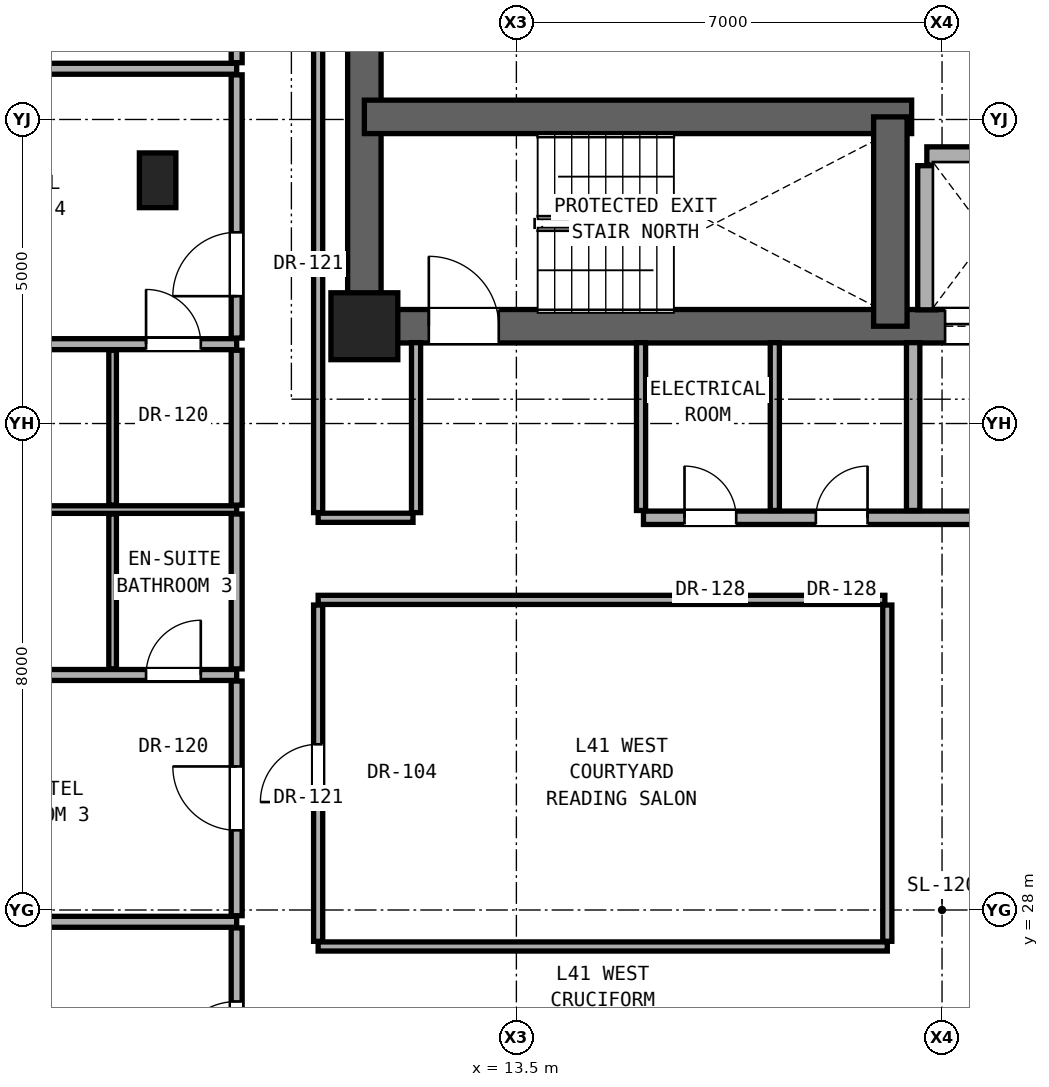
"""IFC4 building model, lengths in metres.
Left out: names, types, materials, properties, quantities, classifications, styles, units other than length and angle.
Written with IfcOpenShell. Run it as: python <this file> out.ifc"""

import sys

from ifc_helpers import new_model, si_unit, direction, frame, frame_2d, origin, origin_2d, place, context, subcontext, project, spatial, rectangle, extrude, element, fill, save


model = new_model("IFC4")
c1 = context("Model", 3, precision=1e-05, world=origin(), true_north=direction((0.0, 1.0)))
c2 = subcontext(c1, "Body", "Model", "MODEL_VIEW")
j1 = project(units=[si_unit("LENGTHUNIT", "METRE"), si_unit("PLANEANGLEUNIT", "RADIAN")], contexts=[c1])
p1 = place(None, origin())
s1 = spatial("IfcSite", under=j1, at=p1, CompositionType="ELEMENT")
p2 = place(p1, origin())
s2 = spatial("IfcBuilding", under=s1, at=p2, CompositionType="ELEMENT")
p3 = place(p2, frame((0.0, 0.0, 144.5)))
s3 = spatial("IfcBuildingStorey", under=s2, at=p3, CompositionType="ELEMENT", Elevation=144.5)
p4 = place(p3, frame((11.0, 37.6, 0.0), z_axis=(0.0, 0.0, 1.0), x_axis=(1.0, 0.0, 0.0)))
e1 = element("IfcColumn", 1, at=p4, inside=s3, PredefinedType="COLUMN", context=c2, shape_type="SweptSolid", body=[
    extrude(rectangle(XDim=1.1, YDim=1.1, at=origin_2d()), origin(), (0.0, 0.0, 1.0), 3.3),
])
p5 = place(p3, frame((7.6, 40.0, 0.0), z_axis=(0.0, 0.0, 1.0), x_axis=(1.0, 0.0, 0.0)))
e2 = element("IfcColumn", 2, at=p5, inside=s3, PredefinedType="PILASTER", context=c2, shape_type="SweptSolid", body=[
    extrude(rectangle(XDim=0.6, YDim=0.9, at=origin_2d()), origin(), (0.0, 0.0, 1.0), 3.3),
])
p6 = place(p3, frame((11.0, 37.6, 0.0), z_axis=(0.0, 0.0, 1.0), x_axis=(0.0, 1.0, 0.0)))
e3 = element("IfcWall", 3, at=p6, inside=s3, PredefinedType="SHEAR", context=c2, shape_type="SweptSolid", body=[
    extrude(rectangle(XDim=6.0, YDim=0.55, at=frame_2d((3.0, 0.0))), origin(), (0.0, 0.0, 1.0), 2.94),
])
p7 = place(p3, frame((11.0, 37.6, 0.0), z_axis=(0.0, 0.0, 1.0), x_axis=(1.0, 0.0, 0.0)))
e4 = element("IfcWall", 4, at=p7, inside=s3, PredefinedType="SHEAR", context=c2, shape_type="SweptSolid", body=[
    extrude(rectangle(XDim=19.0, YDim=0.55, at=frame_2d((9.5, 0.0))), origin(), (0.0, 0.0, 1.0), 2.94),
])
p8 = place(p7, frame((1.06, 0.0, 0.0)))
e5 = element("IfcOpeningElement", 5, at=p8, cuts=e4, PredefinedType="OPENING", context=c2, shape_type="SweptSolid", body=[
    extrude(rectangle(XDim=1.15, YDim=2.2, at=frame_2d((0.575, 1.1))), frame((0.0, 0.285, 0.0), z_axis=(0.0, -1.0, 0.0), x_axis=(1.0, 0.0, 0.0)), (0.0, 0.0, 1.0), 0.57),
])
p9 = place(p7, frame((9.55, 0.0, 0.0)))
e6 = element("IfcOpeningElement", 6, at=p9, cuts=e4, PredefinedType="OPENING", context=c2, shape_type="SweptSolid", body=[
    extrude(rectangle(XDim=1.4, YDim=2.35, at=frame_2d((0.7, 1.175))), frame((0.0, 0.285, 0.0), z_axis=(0.0, -1.0, 0.0), x_axis=(1.0, 0.0, 0.0)), (0.0, 0.0, 1.0), 0.57),
])
p10 = place(p7, frame((11.95, 0.0, 0.0)))
e7 = element("IfcOpeningElement", 7, at=p10, cuts=e4, PredefinedType="OPENING", context=c2, shape_type="SweptSolid", body=[
    extrude(rectangle(XDim=1.4, YDim=2.35, at=frame_2d((0.7, 1.175))), frame((0.0, 0.285, 0.0), z_axis=(0.0, -1.0, 0.0), x_axis=(1.0, 0.0, 0.0)), (0.0, 0.0, 1.0), 0.57),
])
p11 = place(p3, frame((11.0, 41.043, 0.0), z_axis=(0.0, 0.0, 1.0), x_axis=(1.0, 0.0, 0.0)))
e8 = element("IfcWall", 8, at=p11, inside=s3, PredefinedType="SHEAR", context=c2, shape_type="SweptSolid", body=[
    extrude(rectangle(XDim=9.0, YDim=0.55, at=frame_2d((4.5, 0.0))), origin(), (0.0, 0.0, 1.0), 2.94),
])
p12 = place(p3, frame((19.65, 37.6, 0.0), z_axis=(0.0, 0.0, 1.0), x_axis=(0.0, 1.0, 0.0)))
e9 = element("IfcWall", 9, at=p12, inside=s3, PredefinedType="SHEAR", context=c2, shape_type="SweptSolid", body=[
    extrude(rectangle(XDim=3.443, YDim=0.55, at=frame_2d((1.721, 0.0))), origin(), (0.0, 0.0, 1.0), 2.94),
])
p13 = place(p3, frame((10.24, 27.4, 0.0), z_axis=(0.0, 0.0, 1.0), x_axis=(1.0, 0.0, 0.0)))
e10 = element("IfcWall", 10, at=p13, inside=s3, PredefinedType="PARTITIONING", context=c2, shape_type="SweptSolid", body=[
    extrude(rectangle(XDim=9.36, YDim=0.15, at=frame_2d((4.68, 0.0))), origin(), (0.0, 0.0, 1.0), 2.316),
])
p14 = place(p3, frame((-1.62, 27.806, 0.0), z_axis=(0.0, 0.0, 1.0), x_axis=(1.0, 0.0, 0.0)))
e11 = element("IfcWall", 11, at=p14, inside=s3, PredefinedType="PARTITIONING", context=c2, shape_type="SweptSolid", body=[
    extrude(rectangle(XDim=10.52, YDim=0.18, at=frame_2d((5.26, 0.0))), origin(), (0.0, 0.0, 1.0), 2.159),
])
p15 = place(p3, frame((-1.62, 31.865, 0.0), z_axis=(0.0, 0.0, 1.0), x_axis=(1.0, 0.0, 0.0)))
e12 = element("IfcWall", 12, at=p15, inside=s3, PredefinedType="PARTITIONING", context=c2, shape_type="SweptSolid", body=[
    extrude(rectangle(XDim=10.52, YDim=0.18, at=frame_2d((5.26, 0.0))), origin(), (0.0, 0.0, 1.0), 2.159),
])
p16 = place(p15, frame((4.435, 0.0, 0.0)))
e13 = element("IfcOpeningElement", 13, at=p16, cuts=e12, PredefinedType="OPENING", context=c2, shape_type="SweptSolid", body=[
    extrude(rectangle(XDim=0.85, YDim=2.01, at=frame_2d((0.425, 1.005))), frame((0.0, 0.1, 0.0), z_axis=(0.0, -1.0, 0.0), x_axis=(1.0, 0.0, 0.0)), (0.0, 0.0, 1.0), 0.2),
])
p17 = place(p15, frame((9.03, 0.0, 0.0)))
e14 = element("IfcOpeningElement", 14, at=p17, cuts=e12, PredefinedType="OPENING", context=c2, shape_type="SweptSolid", body=[
    extrude(rectangle(XDim=0.9, YDim=2.1, at=frame_2d((0.45, 1.05))), frame((0.0, 0.1, 0.0), z_axis=(0.0, -1.0, 0.0), x_axis=(1.0, 0.0, 0.0)), (0.0, 0.0, 1.0), 0.2),
])
p18 = place(p3, frame((10.24, 33.1, 0.0), z_axis=(0.0, 0.0, 1.0), x_axis=(1.0, 0.0, 0.0)))
e15 = element("IfcWall", 15, at=p18, inside=s3, PredefinedType="PARTITIONING", context=c2, shape_type="SweptSolid", body=[
    extrude(rectangle(XDim=9.32, YDim=0.15, at=frame_2d((4.66, 0.0))), origin(), (0.0, 0.0, 1.0), 2.316),
])
p19 = place(p3, frame((-1.62, 34.585, 0.0), z_axis=(0.0, 0.0, 1.0), x_axis=(1.0, 0.0, 0.0)))
e16 = element("IfcWall", 16, at=p19, inside=s3, PredefinedType="PARTITIONING", context=c2, shape_type="SweptSolid", body=[
    extrude(rectangle(XDim=10.52, YDim=0.125, at=frame_2d((5.26, 0.0))), origin(), (0.0, 0.0, 1.0), 2.159),
])
p20 = place(p3, frame((10.24, 34.45, 0.0), z_axis=(0.0, 0.0, 1.0), x_axis=(1.0, 0.0, 0.0)))
e17 = element("IfcWall", 17, at=p20, inside=s3, PredefinedType="PARTITIONING", context=c2, shape_type="SweptSolid", body=[
    extrude(rectangle(XDim=1.56, YDim=0.15, at=frame_2d((0.78, 0.0))), origin(), (0.0, 0.0, 1.0), 2.316),
])
p21 = place(p3, frame((15.59, 34.45, 0.0), z_axis=(0.0, 0.0, 1.0), x_axis=(1.0, 0.0, 0.0)))
e18 = element("IfcWall", 18, at=p21, inside=s3, PredefinedType="SOLIDWALL", context=c2, shape_type="SweptSolid", body=[
    extrude(rectangle(XDim=15.17, YDim=0.22, at=frame_2d((7.585, 0.0))), origin(), (0.0, 0.0, 1.0), 2.316),
])
p22 = place(p21, frame((6.26, 0.0, 0.0)))
e19 = element("IfcOpeningElement", 19, at=p22, cuts=e18, PredefinedType="OPENING", context=c2, shape_type="SweptSolid", body=[
    extrude(rectangle(XDim=1.2, YDim=2.25, at=frame_2d((0.6, 1.125))), frame((0.0, 0.12, 0.0), z_axis=(0.0, -1.0, 0.0), x_axis=(1.0, 0.0, 0.0)), (0.0, 0.0, 1.0), 0.24),
])
p23 = place(p21, frame((9.96, 0.0, 0.0)))
e20 = element("IfcOpeningElement", 20, at=p23, cuts=e18, PredefinedType="OPENING", context=c2, shape_type="SweptSolid", body=[
    extrude(rectangle(XDim=0.95, YDim=2.15, at=frame_2d((0.475, 1.075))), frame((0.0, 0.12, 0.0), z_axis=(0.0, -1.0, 0.0), x_axis=(1.0, 0.0, 0.0)), (0.0, 0.0, 1.0), 0.24),
])
p24 = place(p21, frame((12.21, 0.0, 0.0)))
e21 = element("IfcOpeningElement", 21, at=p24, cuts=e18, PredefinedType="OPENING", context=c2, shape_type="SweptSolid", body=[
    extrude(rectangle(XDim=0.95, YDim=2.15, at=frame_2d((0.475, 1.075))), frame((0.0, 0.12, 0.0), z_axis=(0.0, -1.0, 0.0), x_axis=(1.0, 0.0, 0.0)), (0.0, 0.0, 1.0), 0.24),
])
p25 = place(p21, frame((0.675, 0.0, 0.0)))
e22 = element("IfcOpeningElement", 22, at=p25, cuts=e18, PredefinedType="OPENING", context=c2, shape_type="SweptSolid", body=[
    extrude(rectangle(XDim=0.85, YDim=2.01, at=frame_2d((0.425, 1.005))), frame((0.0, 0.12, 0.0), z_axis=(0.0, -1.0, 0.0), x_axis=(1.0, 0.0, 0.0)), (0.0, 0.0, 1.0), 0.24),
])
p26 = place(p21, frame((2.835, 0.0, 0.0)))
e23 = element("IfcOpeningElement", 23, at=p26, cuts=e18, PredefinedType="OPENING", context=c2, shape_type="SweptSolid", body=[
    extrude(rectangle(XDim=0.85, YDim=2.01, at=frame_2d((0.425, 1.005))), frame((0.0, 0.12, 0.0), z_axis=(0.0, -1.0, 0.0), x_axis=(1.0, 0.0, 0.0)), (0.0, 0.0, 1.0), 0.24),
])
p27 = place(p3, frame((-1.62, 37.305, 0.0), z_axis=(0.0, 0.0, 1.0), x_axis=(1.0, 0.0, 0.0)))
e24 = element("IfcWall", 24, at=p27, inside=s3, PredefinedType="PARTITIONING", context=c2, shape_type="SweptSolid", body=[
    extrude(rectangle(XDim=10.52, YDim=0.18, at=frame_2d((5.26, 0.0))), origin(), (0.0, 0.0, 1.0), 2.159),
])
p28 = place(p27, frame((4.435, 0.0, 0.0)))
e25 = element("IfcOpeningElement", 25, at=p28, cuts=e24, PredefinedType="OPENING", context=c2, shape_type="SweptSolid", body=[
    extrude(rectangle(XDim=0.85, YDim=2.01, at=frame_2d((0.425, 1.005))), frame((0.0, 0.1, 0.0), z_axis=(0.0, -1.0, 0.0), x_axis=(1.0, 0.0, 0.0)), (0.0, 0.0, 1.0), 0.2),
])
p29 = place(p27, frame((9.03, 0.0, 0.0)))
e26 = element("IfcOpeningElement", 26, at=p29, cuts=e24, PredefinedType="OPENING", context=c2, shape_type="SweptSolid", body=[
    extrude(rectangle(XDim=0.9, YDim=2.1, at=frame_2d((0.45, 1.05))), frame((0.0, 0.1, 0.0), z_axis=(0.0, -1.0, 0.0), x_axis=(1.0, 0.0, 0.0)), (0.0, 0.0, 1.0), 0.2),
])
p30 = place(p3, frame((20.25, 40.4, 0.0), z_axis=(0.0, 0.0, 1.0), x_axis=(1.0, 0.0, 0.0)))
e27 = element("IfcWall", 27, at=p30, inside=s3, PredefinedType="SOLIDWALL", context=c2, shape_type="SweptSolid", body=[
    extrude(rectangle(XDim=4.4, YDim=0.3, at=frame_2d((2.2, 0.0))), origin(), (0.0, 0.0, 1.0), 2.94),
])
p31 = place(p3, frame((3.67, 41.834, 0.0), z_axis=(0.0, 0.0, 1.0), x_axis=(1.0, 0.0, 0.0)))
e28 = element("IfcWall", 28, at=p31, inside=s3, PredefinedType="PARTITIONING", context=c2, shape_type="SweptSolid", body=[
    extrude(rectangle(XDim=5.23, YDim=0.18, at=frame_2d((2.615, 0.0))), origin(), (0.0, 0.0, 1.0), 2.94),
])
p32 = place(p3, frame((6.86, 31.965, 0.0), z_axis=(0.0, 0.0, 1.0), x_axis=(0.0, 1.0, 0.0)))
e29 = element("IfcWall", 29, at=p32, inside=s3, PredefinedType="PARTITIONING", context=c2, shape_type="SweptSolid", body=[
    extrude(rectangle(XDim=2.547, YDim=0.125, at=frame_2d((1.274, 0.0))), origin(), (0.0, 0.0, 1.0), 2.94),
])
p33 = place(p3, frame((6.86, 34.657, 0.0), z_axis=(0.0, 0.0, 1.0), x_axis=(0.0, 1.0, 0.0)))
e30 = element("IfcWall", 30, at=p33, inside=s3, PredefinedType="PARTITIONING", context=c2, shape_type="SweptSolid", body=[
    extrude(rectangle(XDim=2.548, YDim=0.125, at=frame_2d((1.274, 0.0))), origin(), (0.0, 0.0, 1.0), 2.332),
])
p34 = place(p3, frame((8.9, 24.235, 0.0), z_axis=(0.0, 0.0, 1.0), x_axis=(0.0, 1.0, 0.0)))
e31 = element("IfcWall", 31, at=p34, inside=s3, PredefinedType="PARTITIONING", context=c2, shape_type="SweptSolid", body=[
    extrude(rectangle(XDim=3.471, YDim=0.18, at=frame_2d((1.735, 0.0))), origin(), (0.0, 0.0, 1.0), 2.316),
])
p35 = place(p34, frame((1.21, 0.0, 0.0)))
e32 = element("IfcOpeningElement", 32, at=p35, cuts=e31, PredefinedType="OPENING", context=c2, shape_type="SweptSolid", body=[
    extrude(rectangle(XDim=1.05, YDim=2.2, at=frame_2d((0.525, 1.1))), frame((0.0, 0.1, 0.0), z_axis=(0.0, -1.0, 0.0), x_axis=(1.0, 0.0, 0.0)), (0.0, 0.0, 1.0), 0.2),
])
p36 = place(p3, frame((8.9, 27.906, 0.0), z_axis=(0.0, 0.0, 1.0), x_axis=(0.0, 1.0, 0.0)))
e33 = element("IfcWall", 33, at=p36, inside=s3, PredefinedType="PARTITIONING", context=c2, shape_type="SweptSolid", body=[
    extrude(rectangle(XDim=3.859, YDim=0.18, at=frame_2d((1.929, 0.0))), origin(), (0.0, 0.0, 1.0), 2.316),
])
p37 = place(p36, frame((1.405, 0.0, 0.0)))
e34 = element("IfcOpeningElement", 34, at=p37, cuts=e33, PredefinedType="OPENING", context=c2, shape_type="SweptSolid", body=[
    extrude(rectangle(XDim=1.05, YDim=2.2, at=frame_2d((0.525, 1.1))), frame((0.0, 0.1, 0.0), z_axis=(0.0, -1.0, 0.0), x_axis=(1.0, 0.0, 0.0)), (0.0, 0.0, 1.0), 0.2),
])
p38 = place(p3, frame((8.9, 31.965, 0.0), z_axis=(0.0, 0.0, 1.0), x_axis=(0.0, 1.0, 0.0)))
e35 = element("IfcWall", 35, at=p38, inside=s3, PredefinedType="PARTITIONING", context=c2, shape_type="SweptSolid", body=[
    extrude(rectangle(XDim=2.547, YDim=0.18, at=frame_2d((1.274, 0.0))), origin(), (0.0, 0.0, 1.0), 2.94),
])
p39 = place(p3, frame((8.9, 34.657, 0.0), z_axis=(0.0, 0.0, 1.0), x_axis=(0.0, 1.0, 0.0)))
e36 = element("IfcWall", 36, at=p39, inside=s3, PredefinedType="PARTITIONING", context=c2, shape_type="SweptSolid", body=[
    extrude(rectangle(XDim=2.548, YDim=0.18, at=frame_2d((1.274, 0.0))), origin(), (0.0, 0.0, 1.0), 2.332),
])
p40 = place(p3, frame((8.9, 37.405, 0.0), z_axis=(0.0, 0.0, 1.0), x_axis=(0.0, 1.0, 0.0)))
e37 = element("IfcWall", 37, at=p40, inside=s3, PredefinedType="PARTITIONING", context=c2, shape_type="SweptSolid", body=[
    extrude(rectangle(XDim=4.329, YDim=0.18, at=frame_2d((2.165, 0.0))), origin(), (0.0, 0.0, 1.0), 2.316),
])
p41 = place(p40, frame((0.689, 0.0, 0.0)))
e38 = element("IfcOpeningElement", 38, at=p41, cuts=e37, PredefinedType="OPENING", context=c2, shape_type="SweptSolid", body=[
    extrude(rectangle(XDim=1.05, YDim=2.2, at=frame_2d((0.525, 1.1))), frame((0.0, 0.1, 0.0), z_axis=(0.0, -1.0, 0.0), x_axis=(1.0, 0.0, 0.0)), (0.0, 0.0, 1.0), 0.2),
])
p42 = place(p3, frame((8.9, 41.934, 0.0), z_axis=(0.0, 0.0, 1.0), x_axis=(0.0, 1.0, 0.0)))
e39 = element("IfcWall", 39, at=p42, inside=s3, PredefinedType="PARTITIONING", context=c2, shape_type="SweptSolid", body=[
    extrude(rectangle(XDim=5.17, YDim=0.18, at=frame_2d((2.585, 0.0))), origin(), (0.0, 0.0, 1.0), 2.94),
])
p43 = place(p42, frame((2.11, 0.0, 0.0)))
e40 = element("IfcOpeningElement", 40, at=p43, cuts=e39, PredefinedType="OPENING", context=c2, shape_type="SweptSolid", body=[
    extrude(rectangle(XDim=0.95, YDim=2.15, at=frame_2d((0.475, 1.075))), frame((0.0, 0.1, 0.0), z_axis=(0.0, -1.0, 0.0), x_axis=(1.0, 0.0, 0.0)), (0.0, 0.0, 1.0), 0.2),
])
p44 = place(p3, frame((10.24, 27.485, 0.0), z_axis=(0.0, 0.0, 1.0), x_axis=(0.0, 1.0, 0.0)))
e41 = element("IfcWall", 41, at=p44, inside=s3, PredefinedType="PARTITIONING", context=c2, shape_type="SweptSolid", body=[
    extrude(rectangle(XDim=5.53, YDim=0.15, at=frame_2d((2.765, 0.0))), origin(), (0.0, 0.0, 1.0), 2.316),
])
p45 = place(p44, frame((2.29, 0.0, 0.0)))
e42 = element("IfcOpeningElement", 42, at=p45, cuts=e41, PredefinedType="OPENING", context=c2, shape_type="SweptSolid", body=[
    extrude(rectangle(XDim=0.95, YDim=2.15, at=frame_2d((0.475, 1.075))), frame((0.0, 0.085, 0.0), z_axis=(0.0, -1.0, 0.0), x_axis=(1.0, 0.0, 0.0)), (0.0, 0.0, 1.0), 0.17),
])
p46 = place(p3, frame((10.24, 34.535, 0.0), z_axis=(0.0, 0.0, 1.0), x_axis=(0.0, 1.0, 0.0)))
e43 = element("IfcWall", 43, at=p46, inside=s3, PredefinedType="PARTITIONING", context=c2, shape_type="SweptSolid", body=[
    extrude(rectangle(XDim=9.13, YDim=0.15, at=frame_2d((4.565, 0.0))), origin(), (0.0, 0.0, 1.0), 2.316),
])
p47 = place(p3, frame((11.85, 34.535, 0.0), z_axis=(0.0, 0.0, 1.0), x_axis=(0.0, 1.0, 0.0)))
e44 = element("IfcWall", 44, at=p47, inside=s3, PredefinedType="PARTITIONING", context=c2, shape_type="SweptSolid", body=[
    extrude(rectangle(XDim=2.795, YDim=0.15, at=frame_2d((1.397, 0.0))), origin(), (0.0, 0.0, 1.0), 2.94),
])
p48 = place(p3, frame((15.55, 34.57, 0.0), z_axis=(0.0, 0.0, 1.0), x_axis=(0.0, 1.0, 0.0)))
e45 = element("IfcWall", 45, at=p48, inside=s3, PredefinedType="PARTITIONING", context=c2, shape_type="SweptSolid", body=[
    extrude(rectangle(XDim=2.76, YDim=0.15, at=frame_2d((1.38, 0.0))), origin(), (0.0, 0.0, 1.0), 2.469),
])
p49 = place(p3, frame((17.75, 34.57, 0.0), z_axis=(0.0, 0.0, 1.0), x_axis=(0.0, 1.0, 0.0)))
e46 = element("IfcWall", 46, at=p49, inside=s3, PredefinedType="PARTITIONING", context=c2, shape_type="SweptSolid", body=[
    extrude(rectangle(XDim=2.76, YDim=0.15, at=frame_2d((1.38, 0.0))), origin(), (0.0, 0.0, 1.0), 2.94),
])
p50 = place(p3, frame((19.6, 27.485, 0.0), z_axis=(0.0, 0.0, 1.0), x_axis=(0.0, 1.0, 0.0)))
e47 = element("IfcWall", 47, at=p50, inside=s3, PredefinedType="PARTITIONING", context=c2, shape_type="SweptSolid", body=[
    extrude(rectangle(XDim=5.53, YDim=0.15, at=frame_2d((2.765, 0.0))), origin(), (0.0, 0.0, 1.0), 2.316),
])
p51 = place(p3, frame((20.025, 34.57, 0.0), z_axis=(0.0, 0.0, 1.0), x_axis=(0.0, 1.0, 0.0)))
e48 = element("IfcWall", 48, at=p51, inside=s3, PredefinedType="SOLIDWALL", context=c2, shape_type="SweptSolid", body=[
    extrude(rectangle(XDim=2.76, YDim=0.22, at=frame_2d((1.38, 0.0))), origin(), (0.0, 0.0, 1.0), 2.94),
])
p52 = place(p3, frame((20.25, 37.87, 0.0), z_axis=(0.0, 0.0, 1.0), x_axis=(0.0, 1.0, 0.0)))
e49 = element("IfcWall", 49, at=p52, inside=s3, PredefinedType="SOLIDWALL", context=c2, shape_type="SweptSolid", body=[
    extrude(rectangle(XDim=2.37, YDim=0.3, at=frame_2d((1.185, 0.0))), origin(), (0.0, 0.0, 1.0), 2.94),
])
p53 = place(p8, origin())
e50 = element("IfcDoor", 50, at=p53, inside=s3, OperationType="SINGLE_SWING_LEFT", PredefinedType="DOOR", context=c2, shape_type="SweptSolid", body=[
    extrude(rectangle(XDim=1.15, YDim=2.2, at=frame_2d((0.575, 1.1))), frame((0.0, 0.025, 0.0), z_axis=(0.0, -1.0, 0.0), x_axis=(1.0, 0.0, 0.0)), (0.0, 0.0, 1.0), 0.05),
])
fill(e5, e50)
p54 = place(p25, origin())
e51 = element("IfcDoor", 51, at=p54, inside=s3, OperationType="SINGLE_SWING_LEFT", PredefinedType="DOOR", context=c2, shape_type="SweptSolid", body=[
    extrude(rectangle(XDim=0.85, YDim=2.01, at=frame_2d((0.425, 1.005))), frame((0.0, 0.025, 0.0), z_axis=(0.0, -1.0, 0.0), x_axis=(1.0, 0.0, 0.0)), (0.0, 0.0, 1.0), 0.05),
])
fill(e22, e51)
p55 = place(p26, origin())
e52 = element("IfcDoor", 52, at=p55, inside=s3, OperationType="SINGLE_SWING_RIGHT", PredefinedType="DOOR", context=c2, shape_type="SweptSolid", body=[
    extrude(rectangle(XDim=0.85, YDim=2.01, at=frame_2d((0.425, 1.005))), frame((0.0, 0.025, 0.0), z_axis=(0.0, -1.0, 0.0), x_axis=(1.0, 0.0, 0.0)), (0.0, 0.0, 1.0), 0.05),
])
fill(e23, e52)
p56 = place(p35, origin())
e53 = element("IfcDoor", 53, at=p56, inside=s3, OperationType="SINGLE_SWING_LEFT", PredefinedType="DOOR", context=c2, shape_type="SweptSolid", body=[
    extrude(rectangle(XDim=1.05, YDim=2.2, at=frame_2d((0.525, 1.1))), frame((0.0, 0.025, 0.0), z_axis=(0.0, -1.0, 0.0), x_axis=(1.0, 0.0, 0.0)), (0.0, 0.0, 1.0), 0.05),
])
fill(e32, e53)
p57 = place(p37, origin())
e54 = element("IfcDoor", 54, at=p57, inside=s3, OperationType="SINGLE_SWING_RIGHT", PredefinedType="DOOR", context=c2, shape_type="SweptSolid", body=[
    extrude(rectangle(XDim=1.05, YDim=2.2, at=frame_2d((0.525, 1.1))), frame((0.0, 0.025, 0.0), z_axis=(0.0, -1.0, 0.0), x_axis=(1.0, 0.0, 0.0)), (0.0, 0.0, 1.0), 0.05),
])
fill(e34, e54)
p58 = place(p17, origin())
e55 = element("IfcDoor", 55, at=p58, inside=s3, OperationType="SINGLE_SWING_RIGHT", PredefinedType="DOOR", context=c2, shape_type="SweptSolid", body=[
    extrude(rectangle(XDim=0.9, YDim=2.1, at=frame_2d((0.45, 1.05))), frame((0.0, 0.025, 0.0), z_axis=(0.0, -1.0, 0.0), x_axis=(1.0, 0.0, 0.0)), (0.0, 0.0, 1.0), 0.05),
])
fill(e14, e55)
p59 = place(p41, origin())
e56 = element("IfcDoor", 56, at=p59, inside=s3, OperationType="SINGLE_SWING_LEFT", PredefinedType="DOOR", context=c2, shape_type="SweptSolid", body=[
    extrude(rectangle(XDim=1.05, YDim=2.2, at=frame_2d((0.525, 1.1))), frame((0.0, 0.025, 0.0), z_axis=(0.0, -1.0, 0.0), x_axis=(1.0, 0.0, 0.0)), (0.0, 0.0, 1.0), 0.05),
])
fill(e38, e56)
p60 = place(p29, origin())
e57 = element("IfcDoor", 57, at=p60, inside=s3, OperationType="SINGLE_SWING_LEFT", PredefinedType="DOOR", context=c2, shape_type="SweptSolid", body=[
    extrude(rectangle(XDim=0.9, YDim=2.1, at=frame_2d((0.45, 1.05))), frame((0.0, 0.025, 0.0), z_axis=(0.0, -1.0, 0.0), x_axis=(1.0, 0.0, 0.0)), (0.0, 0.0, 1.0), 0.05),
])
fill(e26, e57)
p61 = place(p45, origin())
e58 = element("IfcDoor", 58, at=p61, inside=s3, OperationType="SINGLE_SWING_LEFT", PredefinedType="DOOR", context=c2, shape_type="SweptSolid", body=[
    extrude(rectangle(XDim=0.95, YDim=2.15, at=frame_2d((0.475, 1.075))), frame((0.0, 0.025, 0.0), z_axis=(0.0, -1.0, 0.0), x_axis=(1.0, 0.0, 0.0)), (0.0, 0.0, 1.0), 0.05),
])
fill(e42, e58)
p62 = place(p9, origin())
e59 = element("IfcDoor", 59, at=p62, inside=s3, OperationType="DOUBLE_DOOR_SLIDING", PredefinedType="DOOR", context=c2, shape_type="SweptSolid", body=[
    extrude(rectangle(XDim=1.4, YDim=2.35, at=frame_2d((0.7, 1.175))), frame((0.0, 0.025, 0.0), z_axis=(0.0, -1.0, 0.0), x_axis=(1.0, 0.0, 0.0)), (0.0, 0.0, 1.0), 0.05),
])
fill(e6, e59)
save(model, sys.argv[1])
